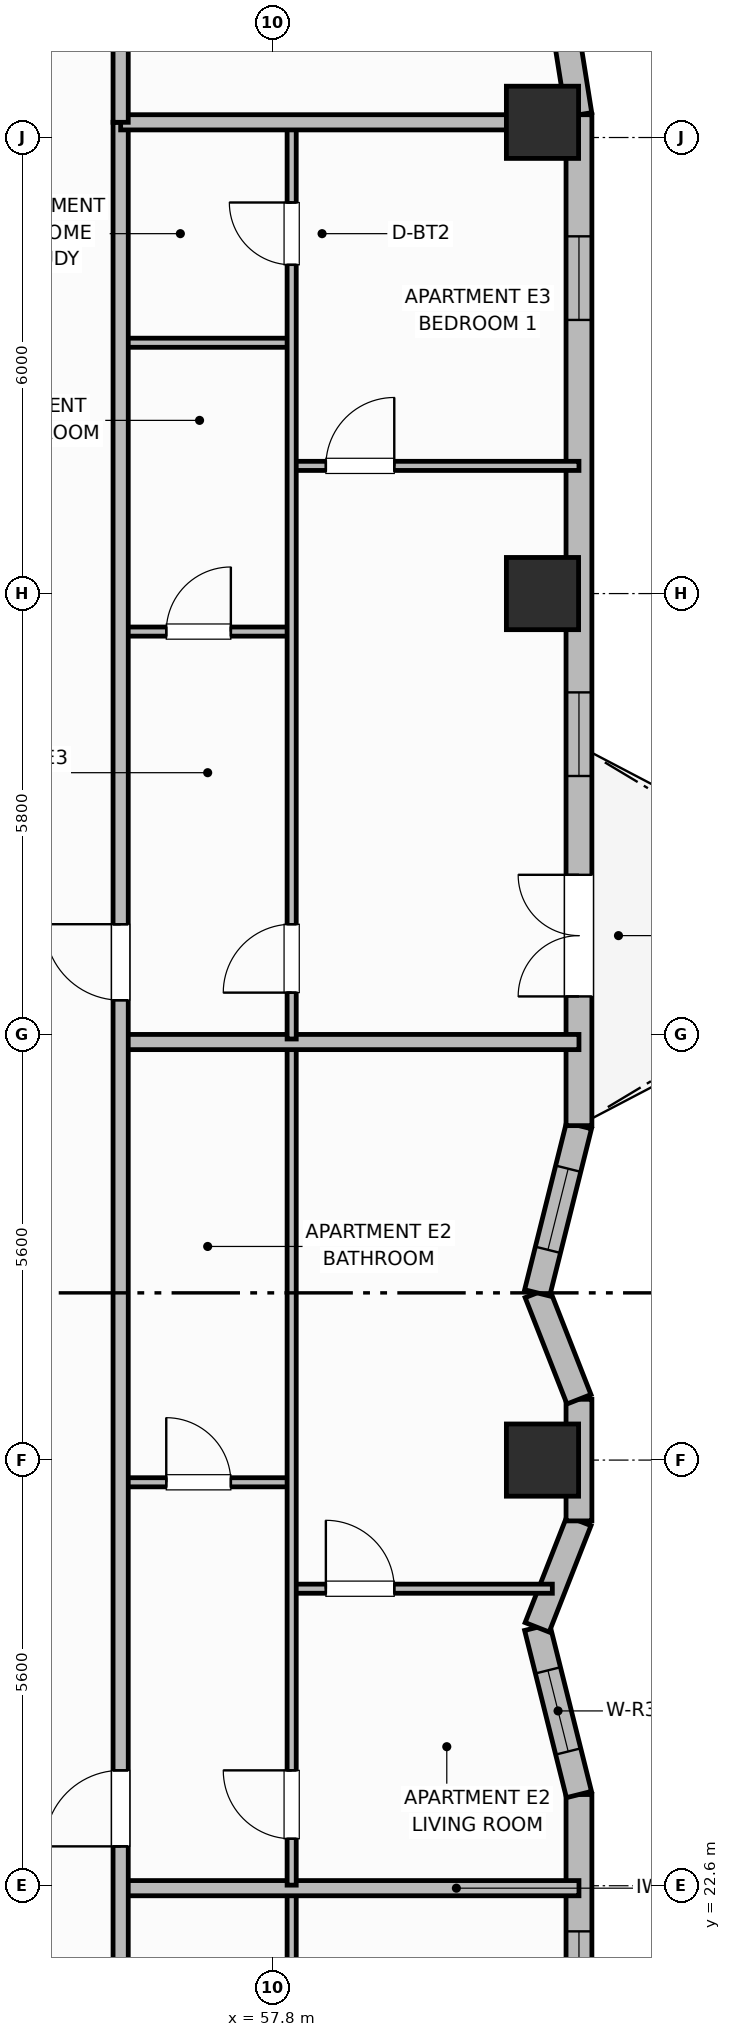
"""IFC4 building model, lengths in metres.
Left out: names, types, materials, properties, quantities, classifications, styles, units other than length and angle.
Written with IfcOpenShell. Run it as: python <this file> out.ifc"""

import sys

from ifc_helpers import new_model, si_unit, direction, frame, frame_2d, origin, origin_2d, place, context, subcontext, project, spatial, rectangle, extrude, element, fill, save


model = new_model("IFC4")
c1 = context("Model", 3, precision=1e-05, world=origin(), true_north=direction((0.0, 1.0)))
c2 = subcontext(c1, "Body", "Model", "MODEL_VIEW")
j1 = project(units=[si_unit("LENGTHUNIT", "METRE"), si_unit("PLANEANGLEUNIT", "RADIAN")], contexts=[c1])
p1 = place(None, origin())
s1 = spatial("IfcSite", under=j1, at=p1, CompositionType="ELEMENT")
p2 = place(p1, origin())
s2 = spatial("IfcBuilding", under=s1, at=p2, CompositionType="ELEMENT")
p3 = place(p2, frame((0.0, 0.0, 147.8)))
s3 = spatial("IfcBuildingStorey", under=s2, at=p3, CompositionType="ELEMENT", Elevation=147.8)
for number, where, z_axis, x_axis in (
    (1, (61.35, 28.2, 0.0), (0.0, 0.0, 1.0), (1.0, 0.0, 0.0)),
    (2, (61.35, 39.6, 0.0), (0.0, 0.0, 1.0), (1.0, 0.0, 0.0)),
    (3, (61.35, 45.8, 0.0), (0.0, 0.0, 1.0), (1.0, 0.0, 0.0)),
):
    element("IfcColumn", number, at=place(p3, frame(where, z_axis=z_axis, x_axis=x_axis)), inside=s3, PredefinedType="COLUMN", context=c2, shape_type="SweptSolid", body=[
        extrude(rectangle(XDim=0.95, YDim=0.95, at=origin_2d()), origin(), (0.0, 0.0, 1.0), 3.7),
    ])
p4 = place(p3, frame((61.83, 10.5, 0.0), z_axis=(0.0, 0.0, 1.0), x_axis=(0.0, 1.0, 0.0)))
e4 = element("IfcWall", 4, at=p4, inside=s3, PredefinedType="SOLIDWALL", context=c2, shape_type="SweptSolid", body=[
    extrude(rectangle(XDim=13.3, YDim=0.34, at=frame_2d((6.65, 0.0))), origin(), (0.0, 0.0, 1.0), 2.72),
])
p5 = place(p4, frame((1.45, 0.0, 0.75)))
e5 = element("IfcOpeningElement", 5, at=p5, cuts=e4, PredefinedType="OPENING", context=c2, shape_type="SweptSolid", body=[
    extrude(rectangle(XDim=1.4, YDim=1.85, at=frame_2d((0.7, 0.925))), frame((0.0, 0.18, 0.0), z_axis=(0.0, -1.0, 0.0), x_axis=(1.0, 0.0, 0.0)), (0.0, 0.0, 1.0), 0.36),
])
p6 = place(p4, frame((7.8, 0.0, 0.75)))
e6 = element("IfcOpeningElement", 6, at=p6, cuts=e4, PredefinedType="OPENING", context=c2, shape_type="SweptSolid", body=[
    extrude(rectangle(XDim=1.4, YDim=1.85, at=frame_2d((0.7, 0.925))), frame((0.0, 0.18, 0.0), z_axis=(0.0, -1.0, 0.0), x_axis=(1.0, 0.0, 0.0)), (0.0, 0.0, 1.0), 0.36),
])
p7 = place(p4, frame((10.1, 0.0, 0.75)))
e7 = element("IfcOpeningElement", 7, at=p7, cuts=e4, PredefinedType="OPENING", context=c2, shape_type="SweptSolid", body=[
    extrude(rectangle(XDim=1.4, YDim=1.85, at=frame_2d((0.7, 0.925))), frame((0.0, 0.18, 0.0), z_axis=(0.0, -1.0, 0.0), x_axis=(1.0, 0.0, 0.0)), (0.0, 0.0, 1.0), 0.36),
])
p8 = place(p3, frame((61.83, 23.8, 0.0), z_axis=(0.0, 0.0, 1.0), x_axis=(-0.242560957029, 0.970136166796, 0.0)))
e8 = element("IfcWall", 8, at=p8, inside=s3, PredefinedType="SOLIDWALL", context=c2, shape_type="SweptSolid", body=[
    extrude(rectangle(XDim=2.268, YDim=0.34, at=frame_2d((1.134, 0.0))), origin(), (0.0, 0.0, 1.0), 2.72),
])
p9 = place(p8, frame((0.584, 0.0, 0.91)))
e9 = element("IfcOpeningElement", 9, at=p9, cuts=e8, PredefinedType="OPENING", context=c2, shape_type="SweptSolid", body=[
    extrude(rectangle(XDim=1.1, YDim=1.65, at=frame_2d((0.55, 0.825))), frame((0.0, 0.18, 0.0), z_axis=(0.0, -1.0, 0.0), x_axis=(1.0, 0.0, 0.0)), (0.0, 0.0, 1.0), 0.36),
])
p10 = place(p3, frame((61.28, 26.0, 0.0), z_axis=(0.0, 0.0, 1.0), x_axis=(0.365702591843, 0.930731762818, 0.0)))
e10 = element("IfcWall", 10, at=p10, inside=s3, PredefinedType="SOLIDWALL", context=c2, shape_type="SweptSolid", body=[
    extrude(rectangle(XDim=1.504, YDim=0.34, at=frame_2d((0.752, 0.0))), origin(), (0.0, 0.0, 1.0), 2.72),
])
p11 = place(p3, frame((61.83, 27.4, 0.0), z_axis=(0.0, 0.0, 1.0), x_axis=(0.0, 1.0, 0.0)))
e11 = element("IfcWall", 11, at=p11, inside=s3, PredefinedType="SOLIDWALL", context=c2, shape_type="SweptSolid", body=[
    extrude(rectangle(XDim=1.6, YDim=0.34, at=frame_2d((0.8, 0.0))), origin(), (0.0, 0.0, 1.0), 2.72),
])
p12 = place(p3, frame((61.83, 29.0, 0.0), z_axis=(0.0, 0.0, 1.0), x_axis=(-0.365702591843, 0.930731762818, 0.0)))
e12 = element("IfcWall", 12, at=p12, inside=s3, PredefinedType="SOLIDWALL", context=c2, shape_type="SweptSolid", body=[
    extrude(rectangle(XDim=1.504, YDim=0.34, at=frame_2d((0.752, 0.0))), origin(), (0.0, 0.0, 1.0), 2.72),
])
p13 = place(p3, frame((61.28, 30.4, 0.0), z_axis=(0.0, 0.0, 1.0), x_axis=(0.242535625036, 0.970142500145, 0.0)))
e13 = element("IfcWall", 13, at=p13, inside=s3, PredefinedType="SOLIDWALL", context=c2, shape_type="SweptSolid", body=[
    extrude(rectangle(XDim=2.268, YDim=0.34, at=frame_2d((1.134, 0.0))), origin(), (0.0, 0.0, 1.0), 2.72),
])
p14 = place(p13, frame((0.584, 0.0, 0.91)))
e14 = element("IfcOpeningElement", 14, at=p14, cuts=e13, PredefinedType="OPENING", context=c2, shape_type="SweptSolid", body=[
    extrude(rectangle(XDim=1.1, YDim=1.65, at=frame_2d((0.55, 0.825))), frame((0.0, 0.18, 0.0), z_axis=(0.0, -1.0, 0.0), x_axis=(1.0, 0.0, 0.0)), (0.0, 0.0, 1.0), 0.36),
])
p15 = place(p3, frame((61.83, 32.6, 0.0), z_axis=(0.0, 0.0, 1.0), x_axis=(0.0, 1.0, 0.0)))
e15 = element("IfcWall", 15, at=p15, inside=s3, PredefinedType="SOLIDWALL", context=c2, shape_type="SweptSolid", body=[
    extrude(rectangle(XDim=13.3, YDim=0.34, at=frame_2d((6.65, 0.0))), origin(), (0.0, 0.0, 1.0), 2.72),
])
p16 = place(p15, frame((1.7, 0.0, 0.0)))
e16 = element("IfcOpeningElement", 16, at=p16, cuts=e15, PredefinedType="OPENING", context=c2, shape_type="SweptSolid", body=[
    extrude(rectangle(XDim=1.6, YDim=2.1, at=frame_2d((0.8, 1.05))), frame((0.0, 0.18, 0.0), z_axis=(0.0, -1.0, 0.0), x_axis=(1.0, 0.0, 0.0)), (0.0, 0.0, 1.0), 0.36),
])
p17 = place(p15, frame((4.6, 0.0, 0.95)))
e17 = element("IfcOpeningElement", 17, at=p17, cuts=e15, PredefinedType="OPENING", context=c2, shape_type="SweptSolid", body=[
    extrude(rectangle(XDim=1.1, YDim=1.65, at=frame_2d((0.55, 0.825))), frame((0.0, 0.18, 0.0), z_axis=(0.0, -1.0, 0.0), x_axis=(1.0, 0.0, 0.0)), (0.0, 0.0, 1.0), 0.36),
])
p18 = place(p15, frame((10.6, 0.0, 0.95)))
e18 = element("IfcOpeningElement", 18, at=p18, cuts=e15, PredefinedType="OPENING", context=c2, shape_type="SweptSolid", body=[
    extrude(rectangle(XDim=1.1, YDim=1.65, at=frame_2d((0.55, 0.825))), frame((0.0, 0.18, 0.0), z_axis=(0.0, -1.0, 0.0), x_axis=(1.0, 0.0, 0.0)), (0.0, 0.0, 1.0), 0.36),
])
p19 = place(p3, frame((61.83, 45.9, 0.0), z_axis=(0.0, 0.0, 1.0), x_axis=(-0.156481329164, 0.987680916907, 0.0)))
e19 = element("IfcWall", 19, at=p19, inside=s3, PredefinedType="SOLIDWALL", context=c2, shape_type="SweptSolid", body=[
    extrude(rectangle(XDim=1.136, YDim=0.34, at=frame_2d((0.568, 0.0))), origin(), (0.0, 0.0, 1.0), 2.72),
])
p20 = place(p3, frame((58.05, 10.64, 0.0), z_axis=(0.0, 0.0, 1.0), x_axis=(0.0, 1.0, 0.0)))
e20 = element("IfcWall", 20, at=p20, inside=s3, PredefinedType="PARTITIONING", context=c2, shape_type="SweptSolid", body=[
    extrude(rectangle(XDim=11.888, YDim=0.12, at=frame_2d((5.944, 0.0))), origin(), (0.0, 0.0, 1.0), 2.55),
])
p21 = place(p20, frame((0.41, 0.0, 0.0)))
e21 = element("IfcOpeningElement", 21, at=p21, cuts=e20, PredefinedType="OPENING", context=c2, shape_type="SweptSolid", body=[
    extrude(rectangle(XDim=0.9, YDim=2.1, at=frame_2d((0.45, 1.05))), frame((0.0, 0.07, 0.0), z_axis=(0.0, -1.0, 0.0), x_axis=(1.0, 0.0, 0.0)), (0.0, 0.0, 1.0), 0.14),
])
p22 = place(p20, frame((10.119, 0.0, 0.0)))
e22 = element("IfcOpeningElement", 22, at=p22, cuts=e20, PredefinedType="OPENING", context=c2, shape_type="SweptSolid", body=[
    extrude(rectangle(XDim=0.82, YDim=2.08, at=frame_2d((0.41, 1.04))), frame((0.0, 0.07, 0.0), z_axis=(0.0, -1.0, 0.0), x_axis=(1.0, 0.0, 0.0)), (0.0, 0.0, 1.0), 0.14),
])
p23 = place(p3, frame((55.8, 22.568, 0.0), z_axis=(0.0, 0.0, 1.0), x_axis=(1.0, 0.0, 0.0)))
e23 = element("IfcWall", 23, at=p23, inside=s3, PredefinedType="PARTITIONING", context=c2, shape_type="SweptSolid", body=[
    extrude(rectangle(XDim=6.03, YDim=0.2, at=frame_2d((3.015, 0.0))), origin(), (0.0, 0.0, 1.0), 2.55),
])
p24 = place(p3, frame((55.8, 27.908, 0.0), z_axis=(0.0, 0.0, 1.0), x_axis=(1.0, 0.0, 0.0)))
e24 = element("IfcWall", 24, at=p24, inside=s3, PredefinedType="PARTITIONING", context=c2, shape_type="SweptSolid", body=[
    extrude(rectangle(XDim=2.25, YDim=0.12, at=frame_2d((1.125, 0.0))), origin(), (0.0, 0.0, 1.0), 2.55),
])
p25 = place(p24, frame((0.6, 0.0, 0.0)))
e25 = element("IfcOpeningElement", 25, at=p25, cuts=e24, PredefinedType="OPENING", context=c2, shape_type="SweptSolid", body=[
    extrude(rectangle(XDim=0.85, YDim=2.1, at=frame_2d((0.425, 1.05))), frame((0.0, 0.07, 0.0), z_axis=(0.0, -1.0, 0.0), x_axis=(1.0, 0.0, 0.0)), (0.0, 0.0, 1.0), 0.14),
])
p26 = place(p3, frame((58.05, 26.508, 0.0), z_axis=(0.0, 0.0, 1.0), x_axis=(1.0, 0.0, 0.0)))
e26 = element("IfcWall", 26, at=p26, inside=s3, PredefinedType="PARTITIONING", context=c2, shape_type="SweptSolid", body=[
    extrude(rectangle(XDim=3.429, YDim=0.12, at=frame_2d((1.715, 0.0))), origin(), (0.0, 0.0, 1.0), 2.55),
])
p27 = place(p26, frame((0.45, 0.0, 0.0)))
e27 = element("IfcOpeningElement", 27, at=p27, cuts=e26, PredefinedType="OPENING", context=c2, shape_type="SweptSolid", body=[
    extrude(rectangle(XDim=0.9, YDim=2.1, at=frame_2d((0.45, 1.05))), frame((0.0, 0.07, 0.0), z_axis=(0.0, -1.0, 0.0), x_axis=(1.0, 0.0, 0.0)), (0.0, 0.0, 1.0), 0.14),
])
p28 = place(p3, frame((58.05, 22.608, 0.0), z_axis=(0.0, 0.0, 1.0), x_axis=(0.0, 1.0, 0.0)))
e28 = element("IfcWall", 28, at=p28, inside=s3, PredefinedType="PARTITIONING", context=c2, shape_type="SweptSolid", body=[
    extrude(rectangle(XDim=11.052, YDim=0.12, at=frame_2d((5.526, 0.0))), origin(), (0.0, 0.0, 1.0), 2.55),
])
p29 = place(p28, frame((0.61, 0.0, 0.0)))
e29 = element("IfcOpeningElement", 29, at=p29, cuts=e28, PredefinedType="OPENING", context=c2, shape_type="SweptSolid", body=[
    extrude(rectangle(XDim=0.9, YDim=2.1, at=frame_2d((0.45, 1.05))), frame((0.0, 0.07, 0.0), z_axis=(0.0, -1.0, 0.0), x_axis=(1.0, 0.0, 0.0)), (0.0, 0.0, 1.0), 0.14),
])
p30 = place(p3, frame((55.8, 33.7, 0.0), z_axis=(0.0, 0.0, 1.0), x_axis=(1.0, 0.0, 0.0)))
e30 = element("IfcWall", 30, at=p30, inside=s3, PredefinedType="PARTITIONING", context=c2, shape_type="SweptSolid", body=[
    extrude(rectangle(XDim=6.03, YDim=0.2, at=frame_2d((3.015, 0.0))), origin(), (0.0, 0.0, 1.0), 2.55),
])
p31 = place(p3, frame((55.8, 39.1, 0.0), z_axis=(0.0, 0.0, 1.0), x_axis=(1.0, 0.0, 0.0)))
e31 = element("IfcWall", 31, at=p31, inside=s3, PredefinedType="PARTITIONING", context=c2, shape_type="SweptSolid", body=[
    extrude(rectangle(XDim=2.25, YDim=0.12, at=frame_2d((1.125, 0.0))), origin(), (0.0, 0.0, 1.0), 2.55),
])
p32 = place(p31, frame((0.6, 0.0, 0.0)))
e32 = element("IfcOpeningElement", 32, at=p32, cuts=e31, PredefinedType="OPENING", context=c2, shape_type="SweptSolid", body=[
    extrude(rectangle(XDim=0.85, YDim=2.1, at=frame_2d((0.425, 1.05))), frame((0.0, 0.07, 0.0), z_axis=(0.0, -1.0, 0.0), x_axis=(1.0, 0.0, 0.0)), (0.0, 0.0, 1.0), 0.14),
])
p33 = place(p3, frame((55.8, 42.9, 0.0), z_axis=(0.0, 0.0, 1.0), x_axis=(1.0, 0.0, 0.0)))
e33 = element("IfcWall", 33, at=p33, inside=s3, PredefinedType="PARTITIONING", context=c2, shape_type="SweptSolid", body=[
    extrude(rectangle(XDim=2.25, YDim=0.12, at=frame_2d((1.125, 0.0))), origin(), (0.0, 0.0, 1.0), 2.55),
])
p34 = place(p3, frame((58.05, 41.28, 0.0), z_axis=(0.0, 0.0, 1.0), x_axis=(1.0, 0.0, 0.0)))
e34 = element("IfcWall", 34, at=p34, inside=s3, PredefinedType="PARTITIONING", context=c2, shape_type="SweptSolid", body=[
    extrude(rectangle(XDim=3.78, YDim=0.12, at=frame_2d((1.89, 0.0))), origin(), (0.0, 0.0, 1.0), 2.55),
])
p35 = place(p34, frame((0.45, 0.0, 0.0)))
e35 = element("IfcOpeningElement", 35, at=p35, cuts=e34, PredefinedType="OPENING", context=c2, shape_type="SweptSolid", body=[
    extrude(rectangle(XDim=0.9, YDim=2.1, at=frame_2d((0.45, 1.05))), frame((0.0, 0.07, 0.0), z_axis=(0.0, -1.0, 0.0), x_axis=(1.0, 0.0, 0.0)), (0.0, 0.0, 1.0), 0.14),
])
p36 = place(p3, frame((58.05, 33.74, 0.0), z_axis=(0.0, 0.0, 1.0), x_axis=(0.0, 1.0, 0.0)))
e36 = element("IfcWall", 36, at=p36, inside=s3, PredefinedType="PARTITIONING", context=c2, shape_type="SweptSolid", body=[
    extrude(rectangle(XDim=12.02, YDim=0.12, at=frame_2d((6.01, 0.0))), origin(), (0.0, 0.0, 1.0), 2.55),
])
p37 = place(p36, frame((0.61, 0.0, 0.0)))
e37 = element("IfcOpeningElement", 37, at=p37, cuts=e36, PredefinedType="OPENING", context=c2, shape_type="SweptSolid", body=[
    extrude(rectangle(XDim=0.9, YDim=2.1, at=frame_2d((0.45, 1.05))), frame((0.0, 0.07, 0.0), z_axis=(0.0, -1.0, 0.0), x_axis=(1.0, 0.0, 0.0)), (0.0, 0.0, 1.0), 0.14),
])
p38 = place(p36, frame((10.185, 0.0, 0.0)))
e38 = element("IfcOpeningElement", 38, at=p38, cuts=e36, PredefinedType="OPENING", context=c2, shape_type="SweptSolid", body=[
    extrude(rectangle(XDim=0.82, YDim=2.08, at=frame_2d((0.41, 1.04))), frame((0.0, 0.07, 0.0), z_axis=(0.0, -1.0, 0.0), x_axis=(1.0, 0.0, 0.0)), (0.0, 0.0, 1.0), 0.14),
])
p39 = place(p3, frame((55.8, 10.6, 0.0), z_axis=(0.0, 0.0, 1.0), x_axis=(0.0, 1.0, 0.0)))
e39 = element("IfcWall", 39, at=p39, inside=s3, PredefinedType="PARTITIONING", context=c2, shape_type="SweptSolid", body=[
    extrude(rectangle(XDim=35.2, YDim=0.2, at=frame_2d((17.6, 0.0))), origin(), (0.0, 0.0, 1.0), 2.55),
])
p40 = place(p39, frame((2.65, 0.0, 0.0)))
e40 = element("IfcOpeningElement", 40, at=p40, cuts=e39, PredefinedType="OPENING", context=c2, shape_type="SweptSolid", body=[
    extrude(rectangle(XDim=1.0, YDim=2.15, at=frame_2d((0.5, 1.075))), frame((0.0, 0.11, 0.0), z_axis=(0.0, -1.0, 0.0), x_axis=(1.0, 0.0, 0.0)), (0.0, 0.0, 1.0), 0.22),
])
p41 = place(p39, frame((12.518, 0.0, 0.0)))
e41 = element("IfcOpeningElement", 41, at=p41, cuts=e39, PredefinedType="OPENING", context=c2, shape_type="SweptSolid", body=[
    extrude(rectangle(XDim=1.0, YDim=2.15, at=frame_2d((0.5, 1.075))), frame((0.0, 0.11, 0.0), z_axis=(0.0, -1.0, 0.0), x_axis=(1.0, 0.0, 0.0)), (0.0, 0.0, 1.0), 0.22),
])
p42 = place(p39, frame((23.65, 0.0, 0.0)))
e42 = element("IfcOpeningElement", 42, at=p42, cuts=e39, PredefinedType="OPENING", context=c2, shape_type="SweptSolid", body=[
    extrude(rectangle(XDim=1.0, YDim=2.15, at=frame_2d((0.5, 1.075))), frame((0.0, 0.11, 0.0), z_axis=(0.0, -1.0, 0.0), x_axis=(1.0, 0.0, 0.0)), (0.0, 0.0, 1.0), 0.22),
])
p43 = place(p3, frame((55.8, 45.8, 0.0), z_axis=(0.0, 0.0, 1.0), x_axis=(1.0, 0.0, 0.0)))
e43 = element("IfcWall", 43, at=p43, inside=s3, PredefinedType="PARTITIONING", context=c2, shape_type="SweptSolid", body=[
    extrude(rectangle(XDim=5.61, YDim=0.2, at=frame_2d((2.805, 0.0))), origin(), (0.0, 0.0, 1.0), 2.55),
])
p44 = place(p3, frame((55.8, 45.8, 0.0), z_axis=(0.0, 0.0, 1.0), x_axis=(0.0, 1.0, 0.0)))
e44 = element("IfcWall", 44, at=p44, inside=s3, PredefinedType="PARTITIONING", context=c2, shape_type="SweptSolid", body=[
    extrude(rectangle(XDim=3.73, YDim=0.2, at=frame_2d((1.865, 0.0))), origin(), (0.0, 0.0, 1.0), 2.55),
])
p45 = place(p7, origin())
e45 = element("IfcWindow", 45, at=p45, inside=s3, PartitioningType="SINGLE_PANEL", PredefinedType="WINDOW", context=c2, shape_type="SweptSolid", body=[
    extrude(rectangle(XDim=1.4, YDim=1.85, at=frame_2d((0.7, 0.925))), frame((0.0, 0.03, 0.0), z_axis=(0.0, -1.0, 0.0), x_axis=(1.0, 0.0, 0.0)), (0.0, 0.0, 1.0), 0.06),
])
fill(e7, e45)
p46 = place(p9, origin())
e46 = element("IfcWindow", 46, at=p46, inside=s3, PartitioningType="SINGLE_PANEL", PredefinedType="WINDOW", context=c2, shape_type="SweptSolid", body=[
    extrude(rectangle(XDim=1.1, YDim=1.65, at=frame_2d((0.55, 0.825))), frame((0.0, 0.03, 0.0), z_axis=(0.0, -1.0, 0.0), x_axis=(1.0, 0.0, 0.0)), (0.0, 0.0, 1.0), 0.06),
])
fill(e9, e46)
p47 = place(p14, origin())
e47 = element("IfcWindow", 47, at=p47, inside=s3, PartitioningType="SINGLE_PANEL", PredefinedType="WINDOW", context=c2, shape_type="SweptSolid", body=[
    extrude(rectangle(XDim=1.1, YDim=1.65, at=frame_2d((0.55, 0.825))), frame((0.0, 0.03, 0.0), z_axis=(0.0, -1.0, 0.0), x_axis=(1.0, 0.0, 0.0)), (0.0, 0.0, 1.0), 0.06),
])
fill(e14, e47)
p48 = place(p16, origin())
e48 = element("IfcDoor", 48, at=p48, inside=s3, OperationType="DOUBLE_DOOR_SINGLE_SWING", PredefinedType="DOOR", context=c2, shape_type="SweptSolid", body=[
    extrude(rectangle(XDim=1.6, YDim=2.1, at=frame_2d((0.8, 1.05))), frame((0.0, 0.025, 0.0), z_axis=(0.0, -1.0, 0.0), x_axis=(1.0, 0.0, 0.0)), (0.0, 0.0, 1.0), 0.05),
])
fill(e16, e48)
p49 = place(p17, origin())
e49 = element("IfcWindow", 49, at=p49, inside=s3, PartitioningType="SINGLE_PANEL", PredefinedType="WINDOW", context=c2, shape_type="SweptSolid", body=[
    extrude(rectangle(XDim=1.1, YDim=1.65, at=frame_2d((0.55, 0.825))), frame((0.0, 0.03, 0.0), z_axis=(0.0, -1.0, 0.0), x_axis=(1.0, 0.0, 0.0)), (0.0, 0.0, 1.0), 0.06),
])
fill(e17, e49)
p50 = place(p18, origin())
e50 = element("IfcWindow", 50, at=p50, inside=s3, PartitioningType="SINGLE_PANEL", PredefinedType="WINDOW", context=c2, shape_type="SweptSolid", body=[
    extrude(rectangle(XDim=1.1, YDim=1.65, at=frame_2d((0.55, 0.825))), frame((0.0, 0.03, 0.0), z_axis=(0.0, -1.0, 0.0), x_axis=(1.0, 0.0, 0.0)), (0.0, 0.0, 1.0), 0.06),
])
fill(e18, e50)
p51 = place(p25, origin())
e51 = element("IfcDoor", 51, at=p51, inside=s3, OperationType="SINGLE_SWING_LEFT", PredefinedType="DOOR", context=c2, shape_type="SweptSolid", body=[
    extrude(rectangle(XDim=0.85, YDim=2.1, at=frame_2d((0.425, 1.05))), frame((0.0, 0.025, 0.0), z_axis=(0.0, -1.0, 0.0), x_axis=(1.0, 0.0, 0.0)), (0.0, 0.0, 1.0), 0.05),
])
fill(e25, e51)
p52 = place(p27, origin())
e52 = element("IfcDoor", 52, at=p52, inside=s3, OperationType="SINGLE_SWING_LEFT", PredefinedType="DOOR", context=c2, shape_type="SweptSolid", body=[
    extrude(rectangle(XDim=0.9, YDim=2.1, at=frame_2d((0.45, 1.05))), frame((0.0, 0.025, 0.0), z_axis=(0.0, -1.0, 0.0), x_axis=(1.0, 0.0, 0.0)), (0.0, 0.0, 1.0), 0.05),
])
fill(e27, e52)
p53 = place(p29, origin())
e53 = element("IfcDoor", 53, at=p53, inside=s3, OperationType="SINGLE_SWING_RIGHT", PredefinedType="DOOR", context=c2, shape_type="SweptSolid", body=[
    extrude(rectangle(XDim=0.9, YDim=2.1, at=frame_2d((0.45, 1.05))), frame((0.0, 0.025, 0.0), z_axis=(0.0, -1.0, 0.0), x_axis=(1.0, 0.0, 0.0)), (0.0, 0.0, 1.0), 0.05),
])
fill(e29, e53)
p54 = place(p32, origin())
e54 = element("IfcDoor", 54, at=p54, inside=s3, OperationType="SINGLE_SWING_RIGHT", PredefinedType="DOOR", context=c2, shape_type="SweptSolid", body=[
    extrude(rectangle(XDim=0.85, YDim=2.1, at=frame_2d((0.425, 1.05))), frame((0.0, 0.025, 0.0), z_axis=(0.0, -1.0, 0.0), x_axis=(1.0, 0.0, 0.0)), (0.0, 0.0, 1.0), 0.05),
])
fill(e32, e54)
p55 = place(p35, origin())
e55 = element("IfcDoor", 55, at=p55, inside=s3, OperationType="SINGLE_SWING_RIGHT", PredefinedType="DOOR", context=c2, shape_type="SweptSolid", body=[
    extrude(rectangle(XDim=0.9, YDim=2.1, at=frame_2d((0.45, 1.05))), frame((0.0, 0.025, 0.0), z_axis=(0.0, -1.0, 0.0), x_axis=(1.0, 0.0, 0.0)), (0.0, 0.0, 1.0), 0.05),
])
fill(e35, e55)
p56 = place(p37, origin())
e56 = element("IfcDoor", 56, at=p56, inside=s3, OperationType="SINGLE_SWING_LEFT", PredefinedType="DOOR", context=c2, shape_type="SweptSolid", body=[
    extrude(rectangle(XDim=0.9, YDim=2.1, at=frame_2d((0.45, 1.05))), frame((0.0, 0.025, 0.0), z_axis=(0.0, -1.0, 0.0), x_axis=(1.0, 0.0, 0.0)), (0.0, 0.0, 1.0), 0.05),
])
fill(e37, e56)
p57 = place(p38, origin())
e57 = element("IfcDoor", 57, at=p57, inside=s3, OperationType="SINGLE_SWING_RIGHT", PredefinedType="DOOR", context=c2, shape_type="SweptSolid", body=[
    extrude(rectangle(XDim=0.82, YDim=2.08, at=frame_2d((0.41, 1.04))), frame((0.0, 0.025, 0.0), z_axis=(0.0, -1.0, 0.0), x_axis=(1.0, 0.0, 0.0)), (0.0, 0.0, 1.0), 0.05),
])
fill(e38, e57)
p58 = place(p41, origin())
e58 = element("IfcDoor", 58, at=p58, inside=s3, OperationType="SINGLE_SWING_LEFT", PredefinedType="DOOR", context=c2, shape_type="SweptSolid", body=[
    extrude(rectangle(XDim=1.0, YDim=2.15, at=frame_2d((0.5, 1.075))), frame((0.0, 0.025, 0.0), z_axis=(0.0, -1.0, 0.0), x_axis=(1.0, 0.0, 0.0)), (0.0, 0.0, 1.0), 0.05),
])
fill(e41, e58)
p59 = place(p42, origin())
e59 = element("IfcDoor", 59, at=p59, inside=s3, OperationType="SINGLE_SWING_RIGHT", PredefinedType="DOOR", context=c2, shape_type="SweptSolid", body=[
    extrude(rectangle(XDim=1.0, YDim=2.15, at=frame_2d((0.5, 1.075))), frame((0.0, 0.025, 0.0), z_axis=(0.0, -1.0, 0.0), x_axis=(1.0, 0.0, 0.0)), (0.0, 0.0, 1.0), 0.05),
])
fill(e42, e59)
save(model, sys.argv[1])
